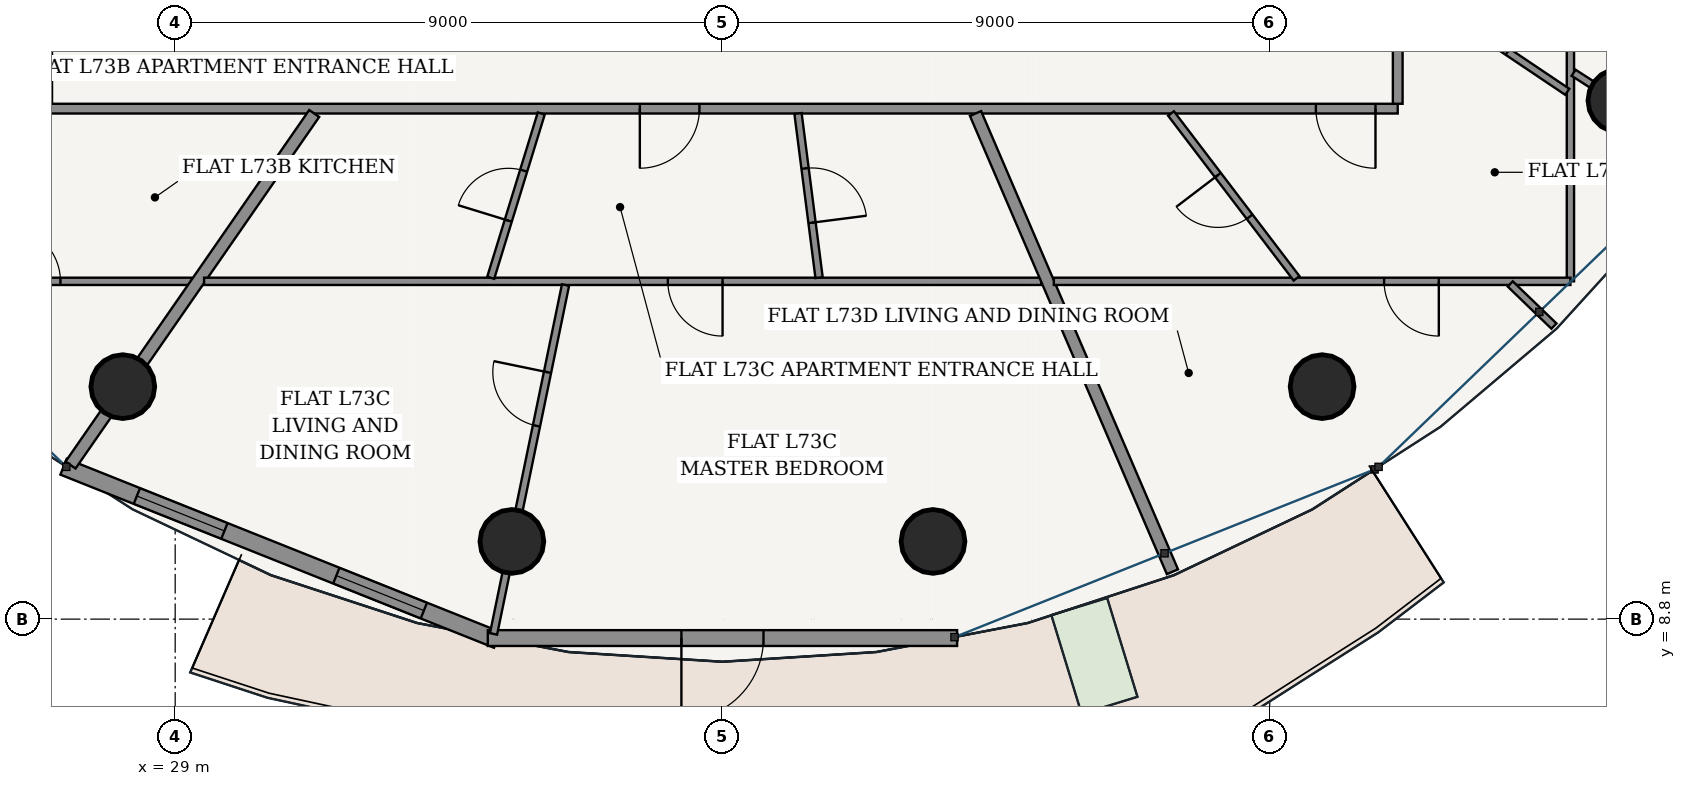
"""IFC4 building model, lengths in metres.
Left out: names, types, materials, properties, quantities, classifications, styles, units other than length and angle.
Written with IfcOpenShell. Run it as: python <this file> out.ifc"""

import sys

from ifc_helpers import new_model, si_unit, direction, frame, frame_2d, origin, origin_2d, place, context, subcontext, project, spatial, rectangle, hollow_circle, extrude, source, transform, mapped, element, fill, save


model = new_model("IFC4")
c1 = context("Model", 3, precision=1e-05, world=origin(), true_north=direction((-0.2419218956, 0.970295726276)))
c2 = subcontext(c1, "Body", "Model", "MODEL_VIEW")
j1 = project(units=[si_unit("LENGTHUNIT", "METRE"), si_unit("PLANEANGLEUNIT", "RADIAN")], contexts=[c1])
p1 = place(None, origin())
s1 = spatial("IfcSite", under=j1, at=p1, CompositionType="ELEMENT")
p2 = place(p1, origin())
s2 = spatial("IfcBuilding", under=s1, at=p2, CompositionType="ELEMENT")
p3 = place(p2, frame((0.0, 0.0, 278.2)))
s3 = spatial("IfcBuildingStorey", under=s2, at=p3, CompositionType="ELEMENT", Elevation=278.2)
for number, where, z_axis, x_axis in (
    (1, (28.139, 12.624, 0.0), (0.0, 0.0, 1.0), (1.0, 0.0, 0.0)),
    (2, (34.537, 10.078, 0.0), (0.0, 0.0, 1.0), (1.0, 0.0, 0.0)),
    (3, (41.463, 10.078, 0.0), (0.0, 0.0, 1.0), (1.0, 0.0, 0.0)),
    (4, (47.861, 12.624, 0.0), (0.0, 0.0, 1.0), (1.0, 0.0, 0.0)),
    (5, (52.759, 17.328, 0.0), (0.0, 0.0, 1.0), (1.0, 0.0, 0.0)),
):
    element("IfcColumn", number, at=place(p3, frame(where, z_axis=z_axis, x_axis=x_axis)), inside=s3, PredefinedType="COLUMN", context=c2, shape_type="SweptSolid", body=[
        extrude(hollow_circle(Radius=0.525, WallThickness=0.035, at=origin_2d()), origin(), (0.0, 0.0, 1.0), 3.75),
    ])
p4 = place(p3, frame((27.164, 11.306, 0.0), z_axis=(0.0, 0.0, 1.0), x_axis=(0.92871332341, -0.370798547626, 0.0)))
e6 = element("IfcWall", 6, at=p4, inside=s3, PredefinedType="SOLIDWALL", context=c2, shape_type="SweptSolid", body=[
    extrude(rectangle(XDim=7.678, YDim=0.28, at=frame_2d((3.839, 0.0))), origin(), (0.0, 0.0, 1.0), 3.49),
])
p5 = place(p4, frame((1.298, 0.0, 0.85)))
e7 = element("IfcOpeningElement", 7, at=p5, cuts=e6, PredefinedType="OPENING", context=c2, shape_type="SweptSolid", body=[
    extrude(rectangle(XDim=1.55, YDim=1.95, at=frame_2d((0.775, 0.975))), frame((0.0, 0.15, 0.0), z_axis=(0.0, -1.0, 0.0), x_axis=(1.0, 0.0, 0.0)), (0.0, 0.0, 1.0), 0.3),
])
p6 = place(p4, frame((4.83, 0.0, 0.85)))
e8 = element("IfcOpeningElement", 8, at=p6, cuts=e6, PredefinedType="OPENING", context=c2, shape_type="SweptSolid", body=[
    extrude(rectangle(XDim=1.55, YDim=1.95, at=frame_2d((0.775, 0.975))), frame((0.0, 0.15, 0.0), z_axis=(0.0, -1.0, 0.0), x_axis=(1.0, 0.0, 0.0)), (0.0, 0.0, 1.0), 0.3),
])
p7 = place(p3, frame((34.141, 8.489, 0.0), z_axis=(0.0, 0.0, 1.0), x_axis=(1.0, 0.0, 0.0)))
e9 = element("IfcWall", 9, at=p7, inside=s3, PredefinedType="SOLIDWALL", context=c2, shape_type="SweptSolid", body=[
    extrude(rectangle(XDim=7.718, YDim=0.26, at=frame_2d((3.859, 0.0))), origin(), (0.0, 0.0, 1.0), 3.49),
])
p8 = place(p7, frame((3.184, 0.0, 0.0)))
e10 = element("IfcOpeningElement", 10, at=p8, cuts=e9, PredefinedType="OPENING", context=c2, shape_type="SweptSolid", body=[
    extrude(rectangle(XDim=1.35, YDim=2.2, at=frame_2d((0.675, 1.1))), frame((0.0, 0.14, 0.0), z_axis=(0.0, -1.0, 0.0), x_axis=(1.0, 0.0, 0.0)), (0.0, 0.0, 1.0), 0.28),
])
p9 = place(p3, frame((26.895, 17.195, 0.0), z_axis=(0.0, 0.0, 1.0), x_axis=(1.0, 0.0, 0.0)))
e11 = element("IfcWall", 11, at=p9, inside=s3, PredefinedType="PARTITIONING", context=c2, shape_type="SweptSolid", body=[
    extrude(rectangle(XDim=22.21, YDim=0.16, at=frame_2d((11.105, 0.0))), origin(), (0.0, 0.0, 1.0), 3.015),
])
p10 = place(p9, frame((9.746, 0.0, 0.0)))
e12 = element("IfcOpeningElement", 12, at=p10, cuts=e11, PredefinedType="OPENING", context=c2, shape_type="SweptSolid", body=[
    extrude(rectangle(XDim=0.98, YDim=2.2, at=frame_2d((0.49, 1.1))), frame((0.0, 0.09, 0.0), z_axis=(0.0, -1.0, 0.0), x_axis=(1.0, 0.0, 0.0)), (0.0, 0.0, 1.0), 0.18),
])
p11 = place(p9, frame((20.864, 0.0, 0.0)))
e13 = element("IfcOpeningElement", 13, at=p11, cuts=e11, PredefinedType="OPENING", context=c2, shape_type="SweptSolid", body=[
    extrude(rectangle(XDim=0.98, YDim=2.2, at=frame_2d((0.49, 1.1))), frame((0.0, 0.09, 0.0), z_axis=(0.0, -1.0, 0.0), x_axis=(1.0, 0.0, 0.0)), (0.0, 0.0, 1.0), 0.18),
])
p12 = place(p3, frame((26.895, 17.275, 0.0), z_axis=(0.0, 0.0, 1.0), x_axis=(0.0, 1.0, 0.0)))
e14 = element("IfcWall", 14, at=p12, inside=s3, PredefinedType="PARTITIONING", context=c2, shape_type="SweptSolid", body=[
    extrude(rectangle(XDim=13.925, YDim=0.16, at=frame_2d((6.962, 0.0))), origin(), (0.0, 0.0, 1.0), 3.015),
])
p13 = place(p12, frame((2.735, 0.0, 0.0)))
e15 = element("IfcOpeningElement", 15, at=p13, cuts=e14, PredefinedType="OPENING", context=c2, shape_type="SweptSolid", body=[
    extrude(rectangle(XDim=0.98, YDim=2.2, at=frame_2d((0.49, 1.1))), frame((0.0, 0.09, 0.0), z_axis=(0.0, -1.0, 0.0), x_axis=(1.0, 0.0, 0.0)), (0.0, 0.0, 1.0), 0.18),
])
p14 = place(p3, frame((49.105, 17.275, 0.0), z_axis=(0.0, 0.0, 1.0), x_axis=(0.0, 1.0, 0.0)))
e16 = element("IfcWall", 16, at=p14, inside=s3, PredefinedType="PARTITIONING", context=c2, shape_type="SweptSolid", body=[
    extrude(rectangle(XDim=13.925, YDim=0.16, at=frame_2d((6.962, 0.0))), origin(), (0.0, 0.0, 1.0), 3.015),
])
p15 = place(p14, frame((11.75, 0.0, 0.0)))
e17 = element("IfcOpeningElement", 17, at=p15, cuts=e16, PredefinedType="OPENING", context=c2, shape_type="SweptSolid", body=[
    extrude(rectangle(XDim=0.98, YDim=2.2, at=frame_2d((0.49, 1.1))), frame((0.0, 0.09, 0.0), z_axis=(0.0, -1.0, 0.0), x_axis=(1.0, 0.0, 0.0)), (0.0, 0.0, 1.0), 0.18),
])
p16 = place(p3, frame((29.271, 14.355, 0.0), z_axis=(0.0, 0.0, 1.0), x_axis=(-1.0, 0.0, 0.0)))
e18 = element("IfcWall", 18, at=p16, inside=s3, PredefinedType="PARTITIONING", context=c2, shape_type="SweptSolid", body=[
    extrude(rectangle(XDim=5.216, YDim=0.12, at=frame_2d((2.608, 0.0))), origin(), (0.0, 0.0, 1.0), 3.015),
])
p17 = place(p16, frame((2.158, 0.0, 0.0)))
e19 = element("IfcOpeningElement", 19, at=p17, cuts=e18, PredefinedType="OPENING", context=c2, shape_type="SweptSolid", body=[
    extrude(rectangle(XDim=0.9, YDim=2.15, at=frame_2d((0.45, 1.075))), frame((0.0, 0.07, 0.0), z_axis=(0.0, -1.0, 0.0), x_axis=(1.0, 0.0, 0.0)), (0.0, 0.0, 1.0), 0.14),
])
p18 = place(p3, frame((31.286, 17.115, 0.0), z_axis=(0.0, 0.0, 1.0), x_axis=(-0.569682734556, -0.821864698079, 0.0)))
e20 = element("IfcWall", 20, at=p18, inside=s3, PredefinedType="PARTITIONING", context=c2, shape_type="SweptSolid", body=[
    extrude(rectangle(XDim=7.034, YDim=0.2, at=frame_2d((3.517, 0.0))), origin(), (0.0, 0.0, 1.0), 3.015),
])
p19 = place(p3, frame((43.246, 14.355, 0.0), z_axis=(0.0, 0.0, 1.0), x_axis=(-1.0, 0.0, 0.0)))
e21 = element("IfcWall", 21, at=p19, inside=s3, PredefinedType="PARTITIONING", context=c2, shape_type="SweptSolid", body=[
    extrude(rectangle(XDim=13.771, YDim=0.12, at=frame_2d((6.885, 0.0))), origin(), (0.0, 0.0, 1.0), 3.015),
])
p20 = place(p19, frame((5.244, 0.0, 0.0)))
e22 = element("IfcOpeningElement", 22, at=p20, cuts=e21, PredefinedType="OPENING", context=c2, shape_type="SweptSolid", body=[
    extrude(rectangle(XDim=0.9, YDim=2.15, at=frame_2d((0.45, 1.075))), frame((0.0, 0.07, 0.0), z_axis=(0.0, -1.0, 0.0), x_axis=(1.0, 0.0, 0.0)), (0.0, 0.0, 1.0), 0.14),
])
p21 = place(p3, frame((35.419, 14.294, 0.0), z_axis=(0.0, 0.0, 1.0), x_axis=(-0.202123253109, -0.979360092383, 0.0)))
e23 = element("IfcWall", 23, at=p21, inside=s3, PredefinedType="PARTITIONING", context=c2, shape_type="SweptSolid", body=[
    extrude(rectangle(XDim=5.858, YDim=0.12, at=frame_2d((2.929, 0.0))), origin(), (0.0, 0.0, 1.0), 3.015),
])
p22 = place(p21, frame((1.464, 0.0, 0.0)))
e24 = element("IfcOpeningElement", 24, at=p22, cuts=e23, PredefinedType="OPENING", context=c2, shape_type="SweptSolid", body=[
    extrude(rectangle(XDim=0.9, YDim=2.15, at=frame_2d((0.45, 1.075))), frame((0.0, 0.07, 0.0), z_axis=(0.0, -1.0, 0.0), x_axis=(1.0, 0.0, 0.0)), (0.0, 0.0, 1.0), 0.14),
])
p23 = place(p3, frame((35.02, 17.115, 0.0), z_axis=(0.0, 0.0, 1.0), x_axis=(-0.294110134522, -0.955771535866, 0.0)))
e25 = element("IfcWall", 25, at=p23, inside=s3, PredefinedType="PARTITIONING", context=c2, shape_type="SweptSolid", body=[
    extrude(rectangle(XDim=2.826, YDim=0.12, at=frame_2d((1.413, 0.0))), origin(), (0.0, 0.0, 1.0), 3.209),
])
p24 = place(p23, frame((0.983, 0.0, 0.0)))
e26 = element("IfcOpeningElement", 26, at=p24, cuts=e25, PredefinedType="OPENING", context=c2, shape_type="SweptSolid", body=[
    extrude(rectangle(XDim=0.86, YDim=2.15, at=frame_2d((0.43, 1.075))), frame((0.0, 0.07, 0.0), z_axis=(0.0, -1.0, 0.0), x_axis=(1.0, 0.0, 0.0)), (0.0, 0.0, 1.0), 0.14),
])
p25 = place(p3, frame((39.243, 17.115, 0.0), z_axis=(0.0, 0.0, 1.0), x_axis=(0.127336357758, -0.991859592882, 0.0)))
e27 = element("IfcWall", 27, at=p25, inside=s3, PredefinedType="PARTITIONING", context=c2, shape_type="SweptSolid", body=[
    extrude(rectangle(XDim=2.721, YDim=0.12, at=frame_2d((1.36, 0.0))), origin(), (0.0, 0.0, 1.0), 3.209),
])
p26 = place(p25, frame((0.91, 0.0, 0.0)))
e28 = element("IfcOpeningElement", 28, at=p26, cuts=e27, PredefinedType="OPENING", context=c2, shape_type="SweptSolid", body=[
    extrude(rectangle(XDim=0.9, YDim=2.15, at=frame_2d((0.45, 1.075))), frame((0.0, 0.07, 0.0), z_axis=(0.0, -1.0, 0.0), x_axis=(1.0, 0.0, 0.0)), (0.0, 0.0, 1.0), 0.14),
])
p27 = place(p3, frame((42.162, 17.115, 0.0), z_axis=(0.0, 0.0, 1.0), x_axis=(0.394795631127, -0.918768964236, 0.0)))
e29 = element("IfcWall", 29, at=p27, inside=s3, PredefinedType="PARTITIONING", context=c2, shape_type="SweptSolid", body=[
    extrude(rectangle(XDim=8.202, YDim=0.2, at=frame_2d((4.101, 0.0))), origin(), (0.0, 0.0, 1.0), 3.121),
])
p28 = place(p3, frame((51.945, 21.13, 0.0), z_axis=(0.0, 0.0, 1.0), x_axis=(0.0, -1.0, 0.0)))
e30 = element("IfcWall", 30, at=p28, inside=s3, PredefinedType="PARTITIONING", context=c2, shape_type="SweptSolid", body=[
    extrude(rectangle(XDim=6.775, YDim=0.12, at=frame_2d((3.388, 0.0))), origin(), (0.0, 0.0, 1.0), 3.015),
])
p29 = place(p28, frame((1.349, 0.0, 0.0)))
e31 = element("IfcOpeningElement", 31, at=p29, cuts=e30, PredefinedType="OPENING", context=c2, shape_type="SweptSolid", body=[
    extrude(rectangle(XDim=0.9, YDim=2.15, at=frame_2d((0.45, 1.075))), frame((0.0, 0.07, 0.0), z_axis=(0.0, -1.0, 0.0), x_axis=(1.0, 0.0, 0.0)), (0.0, 0.0, 1.0), 0.14),
])
p30 = place(p3, frame((51.945, 14.355, 0.0), z_axis=(0.0, 0.0, 1.0), x_axis=(-1.0, 0.0, 0.0)))
e32 = element("IfcWall", 32, at=p30, inside=s3, PredefinedType="PARTITIONING", context=c2, shape_type="SweptSolid", body=[
    extrude(rectangle(XDim=8.495, YDim=0.12, at=frame_2d((4.248, 0.0))), origin(), (0.0, 0.0, 1.0), 3.015),
])
p31 = place(p30, frame((2.164, 0.0, 0.0)))
e33 = element("IfcOpeningElement", 33, at=p31, cuts=e32, PredefinedType="OPENING", context=c2, shape_type="SweptSolid", body=[
    extrude(rectangle(XDim=0.9, YDim=2.15, at=frame_2d((0.45, 1.075))), frame((0.0, 0.07, 0.0), z_axis=(0.0, -1.0, 0.0), x_axis=(1.0, 0.0, 0.0)), (0.0, 0.0, 1.0), 0.14),
])
p32 = place(p3, frame((50.956, 14.312, 0.0), z_axis=(0.0, 0.0, 1.0), x_axis=(0.7199490242, -0.694026946562, 0.0)))
e34 = element("IfcWall", 34, at=p32, inside=s3, PredefinedType="PARTITIONING", context=c2, shape_type="SweptSolid", body=[
    extrude(rectangle(XDim=0.998, YDim=0.12, at=frame_2d((0.499, 0.0))), origin(), (0.0, 0.0, 1.0), 3.49),
])
p33 = place(p3, frame((51.997, 17.785, 0.0), z_axis=(0.0, 0.0, 1.0), x_axis=(0.840715962824, -0.541476379774, 0.0)))
e35 = element("IfcWall", 35, at=p33, inside=s3, PredefinedType="PARTITIONING", context=c2, shape_type="SweptSolid", body=[
    extrude(rectangle(XDim=2.437, YDim=0.12, at=frame_2d((1.219, 0.0))), origin(), (0.0, 0.0, 1.0), 3.015),
])
p34 = place(p3, frame((45.377, 17.115, 0.0), z_axis=(0.0, 0.0, 1.0), x_axis=(0.60588776962, -0.795550130806, 0.0)))
e36 = element("IfcWall", 36, at=p34, inside=s3, PredefinedType="PARTITIONING", context=c2, shape_type="SweptSolid", body=[
    extrude(rectangle(XDim=3.407, YDim=0.12, at=frame_2d((1.704, 0.0))), origin(), (0.0, 0.0, 1.0), 3.209),
])
p35 = place(p34, frame((1.274, 0.0, 0.0)))
e37 = element("IfcOpeningElement", 37, at=p35, cuts=e36, PredefinedType="OPENING", context=c2, shape_type="SweptSolid", body=[
    extrude(rectangle(XDim=0.86, YDim=2.15, at=frame_2d((0.43, 1.075))), frame((0.0, 0.07, 0.0), z_axis=(0.0, -1.0, 0.0), x_axis=(1.0, 0.0, 0.0)), (0.0, 0.0, 1.0), 0.14),
])
p36 = place(p3, frame((49.185, 19.29, 0.0), z_axis=(0.0, 0.0, 1.0), x_axis=(0.830215193761, -0.557443030316, 0.0)))
e38 = element("IfcWall", 38, at=p36, inside=s3, PredefinedType="PARTITIONING", context=c2, shape_type="SweptSolid", body=[
    extrude(rectangle(XDim=3.262, YDim=0.12, at=frame_2d((1.631, 0.0))), origin(), (0.0, 0.0, 1.0), 3.209),
])
p37 = place(p36, frame((1.181, 0.0, 0.0)))
e39 = element("IfcOpeningElement", 39, at=p37, cuts=e38, PredefinedType="OPENING", context=c2, shape_type="SweptSolid", body=[
    extrude(rectangle(XDim=0.9, YDim=2.15, at=frame_2d((0.45, 1.075))), frame((0.0, 0.07, 0.0), z_axis=(0.0, -1.0, 0.0), x_axis=(1.0, 0.0, 0.0)), (0.0, 0.0, 1.0), 0.14),
])
m1 = source(origin(), c2, "Body", "SweptSolid", [
    extrude(rectangle(XDim=1.55, YDim=1.95, at=frame_2d((0.775, 0.975))), frame((0.0, 0.03, 0.0), z_axis=(0.0, -1.0, 0.0), x_axis=(1.0, 0.0, 0.0)), (0.0, 0.0, 1.0), 0.06),
])
p38 = place(p5, origin())
e40 = element("IfcWindow", 40, at=p38, inside=s3, PartitioningType="SINGLE_PANEL", PredefinedType="WINDOW", context=c2, shape_type="MappedRepresentation", body=[
    mapped(m1, transform((0.0, 0.0, 0.0), scale=1.0)),
])
fill(e7, e40)
p39 = place(p6, origin())
e41 = element("IfcWindow", 41, at=p39, inside=s3, PartitioningType="SINGLE_PANEL", PredefinedType="WINDOW", context=c2, shape_type="MappedRepresentation", body=[
    mapped(m1, transform((0.0, 0.0, 0.0), scale=1.0)),
])
fill(e8, e41)
m2 = source(origin(), c2, "Body", "SweptSolid", [
    extrude(rectangle(XDim=1.35, YDim=2.2, at=frame_2d((0.675, 1.1))), frame((0.0, 0.025, 0.0), z_axis=(0.0, -1.0, 0.0), x_axis=(1.0, 0.0, 0.0)), (0.0, 0.0, 1.0), 0.05),
])
p40 = place(p8, frame((1.35, 0.0, 0.0), z_axis=(0.0, 0.0, 1.0), x_axis=(-1.0, 0.0, 0.0)))
e42 = element("IfcDoor", 42, at=p40, inside=s3, OperationType="SINGLE_SWING_RIGHT", PredefinedType="DOOR", context=c2, shape_type="MappedRepresentation", body=[
    mapped(m2, transform((0.0, 0.0, 0.0), scale=1.0)),
])
fill(e10, e42)
m3 = source(origin(), c2, "Body", "SweptSolid", [
    extrude(rectangle(XDim=0.9, YDim=2.15, at=frame_2d((0.45, 1.075))), frame((0.0, 0.025, 0.0), z_axis=(0.0, -1.0, 0.0), x_axis=(1.0, 0.0, 0.0)), (0.0, 0.0, 1.0), 0.05),
])
p41 = place(p17, frame((0.9, 0.0, 0.0), z_axis=(0.0, 0.0, 1.0), x_axis=(-1.0, 0.0, 0.0)))
e43 = element("IfcDoor", 43, at=p41, inside=s3, OperationType="SINGLE_SWING_LEFT", PredefinedType="DOOR", context=c2, shape_type="MappedRepresentation", body=[
    mapped(m3, transform((0.0, 0.0, 0.0), scale=1.0)),
])
fill(e19, e43)
m4 = source(origin(), c2, "Body", "SweptSolid", [
    extrude(rectangle(XDim=0.98, YDim=2.2, at=frame_2d((0.49, 1.1))), frame((0.0, 0.025, 0.0), z_axis=(0.0, -1.0, 0.0), x_axis=(1.0, 0.0, 0.0)), (0.0, 0.0, 1.0), 0.05),
])
p42 = place(p10, frame((0.98, 0.0, 0.0), z_axis=(0.0, 0.0, 1.0), x_axis=(-1.0, 0.0, 0.0)))
e44 = element("IfcDoor", 44, at=p42, inside=s3, OperationType="SINGLE_SWING_RIGHT", PredefinedType="DOOR", context=c2, shape_type="MappedRepresentation", body=[
    mapped(m4, transform((0.0, 0.0, 0.0), scale=1.0)),
])
fill(e12, e44)
m5 = source(origin(), c2, "Body", "SweptSolid", [
    extrude(rectangle(XDim=0.86, YDim=2.15, at=frame_2d((0.43, 1.075))), frame((0.0, 0.025, 0.0), z_axis=(0.0, -1.0, 0.0), x_axis=(1.0, 0.0, 0.0)), (0.0, 0.0, 1.0), 0.05),
])
p43 = place(p24, frame((0.86, 0.0, 0.0), z_axis=(0.0, 0.0, 1.0), x_axis=(-1.0, 0.0, 0.0)))
e45 = element("IfcDoor", 45, at=p43, inside=s3, OperationType="SINGLE_SWING_LEFT", PredefinedType="DOOR", context=c2, shape_type="MappedRepresentation", body=[
    mapped(m5, transform((0.0, 0.0, 0.0), scale=1.0)),
])
fill(e26, e45)
p44 = place(p26, origin())
e46 = element("IfcDoor", 46, at=p44, inside=s3, OperationType="SINGLE_SWING_RIGHT", PredefinedType="DOOR", context=c2, shape_type="MappedRepresentation", body=[
    mapped(m3, transform((0.0, 0.0, 0.0), scale=1.0)),
])
fill(e28, e46)
p45 = place(p20, origin())
e47 = element("IfcDoor", 47, at=p45, inside=s3, OperationType="SINGLE_SWING_LEFT", PredefinedType="DOOR", context=c2, shape_type="MappedRepresentation", body=[
    mapped(m3, transform((0.0, 0.0, 0.0), scale=1.0)),
])
fill(e22, e47)
p46 = place(p22, frame((0.9, 0.0, 0.0), z_axis=(0.0, 0.0, 1.0), x_axis=(-1.0, 0.0, 0.0)))
e48 = element("IfcDoor", 48, at=p46, inside=s3, OperationType="SINGLE_SWING_RIGHT", PredefinedType="DOOR", context=c2, shape_type="MappedRepresentation", body=[
    mapped(m3, transform((0.0, 0.0, 0.0), scale=1.0)),
])
fill(e24, e48)
p47 = place(p11, frame((0.98, 0.0, 0.0), z_axis=(0.0, 0.0, 1.0), x_axis=(-1.0, 0.0, 0.0)))
e49 = element("IfcDoor", 49, at=p47, inside=s3, OperationType="SINGLE_SWING_LEFT", PredefinedType="DOOR", context=c2, shape_type="MappedRepresentation", body=[
    mapped(m4, transform((0.0, 0.0, 0.0), scale=1.0)),
])
fill(e13, e49)
p48 = place(p35, frame((0.86, 0.0, 0.0), z_axis=(0.0, 0.0, 1.0), x_axis=(-1.0, 0.0, 0.0)))
e50 = element("IfcDoor", 50, at=p48, inside=s3, OperationType="SINGLE_SWING_RIGHT", PredefinedType="DOOR", context=c2, shape_type="MappedRepresentation", body=[
    mapped(m5, transform((0.0, 0.0, 0.0), scale=1.0)),
])
fill(e37, e50)
p49 = place(p31, origin())
e51 = element("IfcDoor", 51, at=p49, inside=s3, OperationType="SINGLE_SWING_LEFT", PredefinedType="DOOR", context=c2, shape_type="MappedRepresentation", body=[
    mapped(m3, transform((0.0, 0.0, 0.0), scale=1.0)),
])
fill(e33, e51)
p50 = place(p37, origin())
e52 = element("IfcDoor", 52, at=p50, inside=s3, OperationType="SINGLE_SWING_RIGHT", PredefinedType="DOOR", context=c2, shape_type="MappedRepresentation", body=[
    mapped(m3, transform((0.0, 0.0, 0.0), scale=1.0)),
])
fill(e39, e52)
save(model, sys.argv[1])
